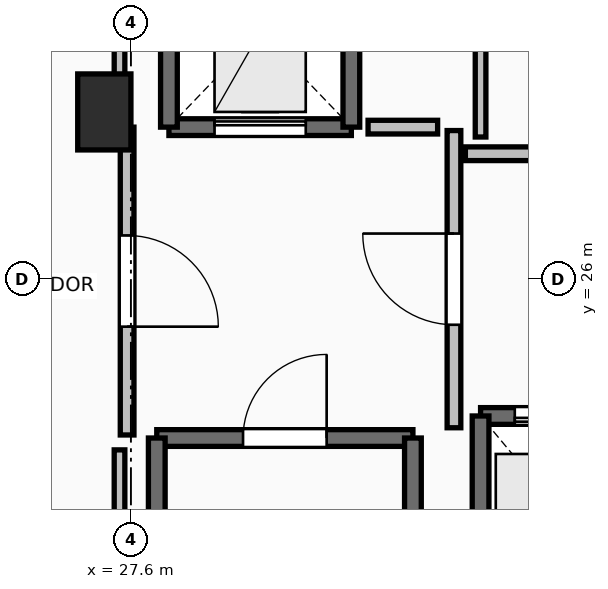
"""IFC4 building model, lengths in metres.
Left out: names, types, materials, properties, quantities, classifications, styles, units other than length and angle.
Written with IfcOpenShell. Run it as: python <this file> out.ifc"""

import sys

from ifc_helpers import new_model, si_unit, direction, frame, frame_2d, origin, origin_2d, place, context, subcontext, project, spatial, rectangle, extrude, element, fill, save


model = new_model("IFC4")
c1 = context("Model", 3, precision=1e-05, world=origin(), true_north=direction((0.0, 1.0)))
c2 = subcontext(c1, "Body", "Model", "MODEL_VIEW")
j1 = project(units=[si_unit("LENGTHUNIT", "METRE"), si_unit("PLANEANGLEUNIT", "RADIAN")], contexts=[c1])
p1 = place(None, origin())
s1 = spatial("IfcSite", under=j1, at=p1, CompositionType="ELEMENT")
p2 = place(p1, origin())
s2 = spatial("IfcBuilding", under=s1, at=p2, CompositionType="ELEMENT")
p3 = place(p2, frame((0.0, 0.0, 207.2)))
s3 = spatial("IfcBuildingStorey", under=s2, at=p3, CompositionType="ELEMENT", Elevation=207.2)
p4 = place(p3, frame((27.25, 28.2, 0.0), z_axis=(0.0, 0.0, 1.0), x_axis=(1.0, 0.0, 0.0)))
e1 = element("IfcColumn", 1, at=p4, inside=s3, PredefinedType="PILASTER", context=c2, shape_type="SweptSolid", body=[
    extrude(rectangle(XDim=0.7, YDim=1.0, at=origin_2d()), origin(), (0.0, 0.0, 1.0), 3.55),
])
p5 = place(p3, frame((27.94, 23.91, 0.0), z_axis=(0.0, 0.0, 1.0), x_axis=(1.0, 0.0, 0.0)))
e2 = element("IfcWall", 2, at=p5, inside=s3, PredefinedType="SOLIDWALL", context=c2, shape_type="SweptSolid", body=[
    extrude(rectangle(XDim=3.37, YDim=0.22, at=frame_2d((1.685, 0.0))), origin(), (0.0, 0.0, 1.0), 3.29),
])
p6 = place(p5, frame((1.135, 0.0, 0.0)))
e3 = element("IfcOpeningElement", 3, at=p6, cuts=e2, PredefinedType="OPENING", context=c2, shape_type="SweptSolid", body=[
    extrude(rectangle(XDim=1.1, YDim=2.15, at=frame_2d((0.55, 1.075))), frame((0.0, 0.125, 0.0), z_axis=(0.0, -1.0, 0.0), x_axis=(1.0, 0.0, 0.0)), (0.0, 0.0, 1.0), 0.25),
])
for number, where, z_axis, x_axis in (
    (4, (31.31, 23.91, 0.0), (0.0, 0.0, 1.0), (0.0, -1.0, 0.0)),
    (5, (27.94, 16.49, 0.0), (0.0, 0.0, 1.0), (0.0, 1.0, 0.0)),
):
    element("IfcWall", number, at=place(p3, frame(where, z_axis=z_axis, x_axis=x_axis)), inside=s3, PredefinedType="SOLIDWALL", context=c2, shape_type="SweptSolid", body=[
        extrude(rectangle(XDim=7.42, YDim=0.22, at=frame_2d((3.71, 0.0))), origin(), (0.0, 0.0, 1.0), 3.29),
    ])
p7 = place(p3, frame((34.2, 24.2, 0.0), z_axis=(0.0, 0.0, 1.0), x_axis=(-1.0, 0.0, 0.0)))
e6 = element("IfcWall", 6, at=p7, inside=s3, PredefinedType="SOLIDWALL", context=c2, shape_type="SweptSolid", body=[
    extrude(rectangle(XDim=2.0, YDim=0.22, at=frame_2d((1.0, 0.0))), origin(), (0.0, 0.0, 1.0), 3.29),
])
p8 = place(p7, frame((0.45, 0.0, 0.0)))
e7 = element("IfcOpeningElement", 7, at=p8, cuts=e6, PredefinedType="OPENING", context=c2, shape_type="SweptSolid", body=[
    extrude(rectangle(XDim=1.1, YDim=2.2, at=frame_2d((0.55, 1.1))), frame((0.0, 0.125, 0.0), z_axis=(0.0, -1.0, 0.0), x_axis=(1.0, 0.0, 0.0)), (0.0, 0.0, 1.0), 0.25),
])
p9 = place(p3, frame((32.2, 24.2, 0.0), z_axis=(0.0, 0.0, 1.0), x_axis=(0.0, -1.0, 0.0)))
e8 = element("IfcWall", 8, at=p9, inside=s3, PredefinedType="SOLIDWALL", context=c2, shape_type="SweptSolid", body=[
    extrude(rectangle(XDim=2.4, YDim=0.22, at=frame_2d((1.2, 0.0))), origin(), (0.0, 0.0, 1.0), 3.29),
])
p10 = place(p3, frame((28.1, 28.0, 0.0), z_axis=(0.0, 0.0, 1.0), x_axis=(1.0, 0.0, 0.0)))
e9 = element("IfcWall", 9, at=p10, inside=s3, PredefinedType="SHEAR", context=c2, shape_type="SweptSolid", body=[
    extrude(rectangle(XDim=2.4, YDim=0.22, at=frame_2d((1.2, 0.0))), origin(), (0.0, 0.0, 1.0), 3.29),
])
p11 = place(p10, frame((0.6, 0.0, 0.0)))
e10 = element("IfcOpeningElement", 10, at=p11, cuts=e9, PredefinedType="OPENING", context=c2, shape_type="SweptSolid", body=[
    extrude(rectangle(XDim=1.2, YDim=2.2, at=frame_2d((0.6, 1.1))), frame((0.0, 0.125, 0.0), z_axis=(0.0, -1.0, 0.0), x_axis=(1.0, 0.0, 0.0)), (0.0, 0.0, 1.0), 0.25),
])
for number, where, z_axis, x_axis in (
    (11, (30.5, 28.0, 0.0), (0.0, 0.0, 1.0), (0.0, 1.0, 0.0)),
    (12, (28.1, 30.5, 0.0), (0.0, 0.0, 1.0), (0.0, -1.0, 0.0)),
):
    element("IfcWall", number, at=place(p3, frame(where, z_axis=z_axis, x_axis=x_axis)), inside=s3, PredefinedType="SHEAR", context=c2, shape_type="SweptSolid", body=[
        extrude(rectangle(XDim=2.5, YDim=0.22, at=frame_2d((1.25, 0.0))), origin(), (0.0, 0.0, 1.0), 3.29),
    ])
p12 = place(p3, frame((31.85, 24.045, 0.0), z_axis=(0.0, 0.0, 1.0), x_axis=(0.0, 1.0, 0.0)))
e13 = element("IfcWall", 13, at=p12, inside=s3, PredefinedType="PARTITIONING", context=c2, shape_type="SweptSolid", body=[
    extrude(rectangle(XDim=3.91, YDim=0.18, at=frame_2d((1.955, 0.0))), origin(), (0.0, 0.0, 1.0), 3.29),
])
p13 = place(p12, frame((1.355, 0.0, 0.0)))
e14 = element("IfcOpeningElement", 14, at=p13, cuts=e13, PredefinedType="OPENING", context=c2, shape_type="SweptSolid", body=[
    extrude(rectangle(XDim=1.2, YDim=2.15, at=frame_2d((0.6, 1.075))), frame((0.0, 0.105, 0.0), z_axis=(0.0, -1.0, 0.0), x_axis=(1.0, 0.0, 0.0)), (0.0, 0.0, 1.0), 0.21),
])
p14 = place(p3, frame((27.55, 28.0, 0.0), z_axis=(0.0, 0.0, 1.0), x_axis=(0.0, -1.0, 0.0)))
e15 = element("IfcWall", 15, at=p14, inside=s3, PredefinedType="PARTITIONING", context=c2, shape_type="SweptSolid", body=[
    extrude(rectangle(XDim=4.05, YDim=0.18, at=frame_2d((2.025, 0.0))), origin(), (0.0, 0.0, 1.0), 3.29),
])
p15 = place(p14, frame((1.425, 0.0, 0.0)))
e16 = element("IfcOpeningElement", 16, at=p15, cuts=e15, PredefinedType="OPENING", context=c2, shape_type="SweptSolid", body=[
    extrude(rectangle(XDim=1.2, YDim=2.15, at=frame_2d((0.6, 1.075))), frame((0.0, 0.105, 0.0), z_axis=(0.0, -1.0, 0.0), x_axis=(1.0, 0.0, 0.0)), (0.0, 0.0, 1.0), 0.21),
])
p16 = place(p3, frame((39.19, 27.65, 0.0), z_axis=(0.0, 0.0, 1.0), x_axis=(-1.0, 0.0, 0.0)))
e17 = element("IfcWall", 17, at=p16, inside=s3, PredefinedType="PARTITIONING", context=c2, shape_type="SweptSolid", body=[
    extrude(rectangle(XDim=7.19, YDim=0.18, at=frame_2d((3.595, 0.0))), origin(), (0.0, 0.0, 1.0), 3.29),
])
p17 = place(p16, frame((3.095, 0.0, 0.0)))
e18 = element("IfcOpeningElement", 18, at=p17, cuts=e17, PredefinedType="OPENING", context=c2, shape_type="SweptSolid", body=[
    extrude(rectangle(XDim=1.0, YDim=2.15, at=frame_2d((0.5, 1.075))), frame((0.0, 0.105, 0.0), z_axis=(0.0, -1.0, 0.0), x_axis=(1.0, 0.0, 0.0)), (0.0, 0.0, 1.0), 0.21),
])
p18 = place(p3, frame((31.635, 28.0, 0.0), z_axis=(0.0, 0.0, 1.0), x_axis=(-1.0, 0.0, 0.0)))
e19 = element("IfcWall", 19, at=p18, inside=s3, PredefinedType="PARTITIONING", context=c2, shape_type="SweptSolid", body=[
    extrude(rectangle(XDim=0.915, YDim=0.18, at=frame_2d((0.458, 0.0))), origin(), (0.0, 0.0, 1.0), 3.29),
])
p19 = place(p3, frame((32.2, 30.26, 0.0), z_axis=(0.0, 0.0, 1.0), x_axis=(0.0, -1.0, 0.0)))
e20 = element("IfcWall", 20, at=p19, inside=s3, PredefinedType="PARTITIONING", context=c2, shape_type="SweptSolid", body=[
    extrude(rectangle(XDim=2.39, YDim=0.14, at=frame_2d((1.195, 0.0))), origin(), (0.0, 0.0, 1.0), 3.29),
])
p20 = place(p3, frame((27.45, 33.45, 0.0), z_axis=(0.0, 0.0, 1.0), x_axis=(0.0, -1.0, 0.0)))
e21 = element("IfcWall", 21, at=p20, inside=s3, PredefinedType="PARTITIONING", context=c2, shape_type="SweptSolid", body=[
    extrude(rectangle(XDim=5.254, YDim=0.14, at=frame_2d((2.627, 0.0))), origin(), (0.0, 0.0, 1.0), 2.482),
])
p21 = place(p3, frame((27.45, 23.754, 0.0), z_axis=(0.0, 0.0, 1.0), x_axis=(0.0, -1.0, 0.0)))
e22 = element("IfcWall", 22, at=p21, inside=s3, PredefinedType="PARTITIONING", context=c2, shape_type="SweptSolid", body=[
    extrude(rectangle(XDim=7.514, YDim=0.14, at=frame_2d((3.757, 0.0))), origin(), (0.0, 0.0, 1.0), 2.482),
])
p22 = place(p6, origin())
e23 = element("IfcDoor", 23, at=p22, inside=s3, OperationType="SINGLE_SWING_RIGHT", PredefinedType="DOOR", context=c2, shape_type="SweptSolid", body=[
    extrude(rectangle(XDim=1.1, YDim=2.15, at=frame_2d((0.55, 1.075))), frame((0.0, 0.025, 0.0), z_axis=(0.0, -1.0, 0.0), x_axis=(1.0, 0.0, 0.0)), (0.0, 0.0, 1.0), 0.05),
])
fill(e3, e23)
p23 = place(p8, origin())
e24 = element("IfcDoor", 24, at=p23, inside=s3, OperationType="SLIDING_TO_LEFT", PredefinedType="DOOR", context=c2, shape_type="SweptSolid", body=[
    extrude(rectangle(XDim=1.1, YDim=2.2, at=frame_2d((0.55, 1.1))), frame((0.0, 0.025, 0.0), z_axis=(0.0, -1.0, 0.0), x_axis=(1.0, 0.0, 0.0)), (0.0, 0.0, 1.0), 0.05),
])
fill(e7, e24)
p24 = place(p11, origin())
e25 = element("IfcDoor", 25, at=p24, inside=s3, OperationType="SLIDING_TO_LEFT", PredefinedType="DOOR", context=c2, shape_type="SweptSolid", body=[
    extrude(rectangle(XDim=1.2, YDim=2.2, at=frame_2d((0.6, 1.1))), frame((0.0, 0.025, 0.0), z_axis=(0.0, -1.0, 0.0), x_axis=(1.0, 0.0, 0.0)), (0.0, 0.0, 1.0), 0.05),
])
fill(e10, e25)
p25 = place(p13, origin())
e26 = element("IfcDoor", 26, at=p25, inside=s3, OperationType="SINGLE_SWING_RIGHT", PredefinedType="DOOR", context=c2, shape_type="SweptSolid", body=[
    extrude(rectangle(XDim=1.2, YDim=2.15, at=frame_2d((0.6, 1.075))), frame((0.0, 0.025, 0.0), z_axis=(0.0, -1.0, 0.0), x_axis=(1.0, 0.0, 0.0)), (0.0, 0.0, 1.0), 0.05),
])
fill(e14, e26)
p26 = place(p15, origin())
e27 = element("IfcDoor", 27, at=p26, inside=s3, OperationType="SINGLE_SWING_RIGHT", PredefinedType="DOOR", context=c2, shape_type="SweptSolid", body=[
    extrude(rectangle(XDim=1.2, YDim=2.15, at=frame_2d((0.6, 1.075))), frame((0.0, 0.025, 0.0), z_axis=(0.0, -1.0, 0.0), x_axis=(1.0, 0.0, 0.0)), (0.0, 0.0, 1.0), 0.05),
])
fill(e16, e27)
save(model, sys.argv[1])
